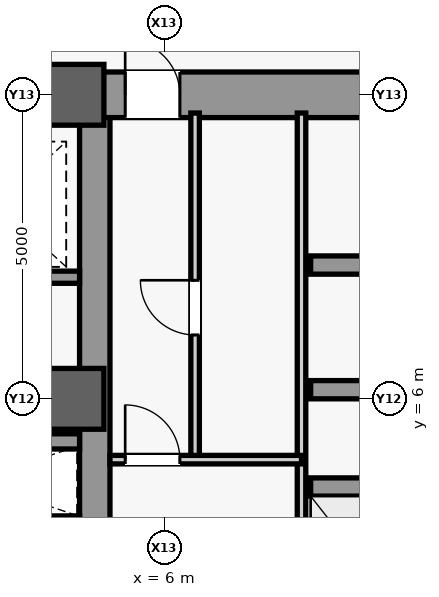
"""IFC4 building model, lengths in metres.
Left out: names, types, materials, properties, quantities, classifications, styles, units other than length and angle.
Written with IfcOpenShell. Run it as: python <this file> out.ifc"""

import sys

from ifc_helpers import new_model, si_unit, direction, frame, frame_2d, origin, origin_2d, place, context, subcontext, project, spatial, rectangle, extrude, source, transform, mapped, element, fill, save


model = new_model("IFC4")
c1 = context("Model", 3, precision=1e-05, world=origin(), true_north=direction((0.0, 1.0)))
c2 = subcontext(c1, "Body", "Model", "MODEL_VIEW")
j1 = project(units=[si_unit("LENGTHUNIT", "METRE"), si_unit("PLANEANGLEUNIT", "RADIAN")], contexts=[c1])
p1 = place(None, origin())
s1 = spatial("IfcSite", under=j1, at=p1, CompositionType="ELEMENT")
p2 = place(p1, origin())
s2 = spatial("IfcBuilding", under=s1, at=p2, CompositionType="ELEMENT")
p3 = place(p2, frame((0.0, 0.0, 116.0)))
s3 = spatial("IfcBuildingStorey", under=s2, at=p3, CompositionType="ELEMENT", Elevation=116.0)
m1 = source(origin(), c2, "Body", "SweptSolid", [
    extrude(rectangle(XDim=21.4, YDim=0.5, at=frame_2d((10.7, 0.0))), origin(), (0.0, 0.0, 1.0), 3.84),
])
p4 = place(p3, frame((4.85, -10.7, 0.0), z_axis=(0.0, 0.0, 1.0), x_axis=(0.0, 1.0, 0.0)))
e1 = element("IfcWall", 1, at=p4, inside=s3, PredefinedType="SHEAR", context=c2, shape_type="MappedRepresentation", body=[
    mapped(m1, transform((0.0, 0.0, 0.0), scale=1.0)),
])
m2 = source(origin(), c2, "Body", "SweptSolid", [
    extrude(rectangle(XDim=5.85, YDim=0.75, at=frame_2d((2.925, 0.0))), origin(), (0.0, 0.0, 1.0), 3.84),
])
p5 = place(p3, frame((4.85, 11.0, 0.0), z_axis=(0.0, 0.0, 1.0), x_axis=(1.0, 0.0, 0.0)))
e2 = element("IfcWall", 2, at=p5, inside=s3, PredefinedType="SHEAR", context=c2, shape_type="MappedRepresentation", body=[
    mapped(m2, transform((0.0, 0.0, 0.0), scale=1.0)),
])
m3 = source(origin(), c2, "Body", "SweptSolid", [
    extrude(rectangle(XDim=0.9, YDim=2.15, at=frame_2d((0.45, 1.075))), frame((0.0, 0.385, 0.0), z_axis=(0.0, -1.0, 0.0), x_axis=(1.0, 0.0, 0.0)), (0.0, 0.0, 1.0), 0.77),
])
p6 = place(p5, frame((0.5, 0.0, 0.0)))
e3 = element("IfcOpeningElement", 3, at=p6, cuts=e2, PredefinedType="OPENING", context=c2, shape_type="MappedRepresentation", body=[
    mapped(m3, transform((0.0, 0.0, 0.0), scale=1.0)),
])
m4 = source(origin(), c2, "Body", "SweptSolid", [
    extrude(rectangle(XDim=9.2, YDim=0.5, at=frame_2d((4.6, 0.0))), origin(), (0.0, 0.0, 1.0), 3.84),
])
p7 = place(p3, frame((-4.6, 11.0, 0.0), z_axis=(0.0, 0.0, 1.0), x_axis=(1.0, 0.0, 0.0)))
e4 = element("IfcWall", 4, at=p7, inside=s3, PredefinedType="SHEAR", context=c2, shape_type="MappedRepresentation", body=[
    mapped(m4, transform((0.0, 0.0, 0.0), scale=1.0)),
])
m5 = source(origin(), c2, "Body", "SweptSolid", [
    extrude(rectangle(XDim=1.8, YDim=2.25, at=frame_2d((0.9, 1.125))), frame((0.0, 0.26, 0.0), z_axis=(0.0, -1.0, 0.0), x_axis=(1.0, 0.0, 0.0)), (0.0, 0.0, 1.0), 0.52),
])
p8 = place(p7, frame((3.7, 0.0, 0.0)))
e5 = element("IfcOpeningElement", 5, at=p8, cuts=e4, PredefinedType="OPENING", context=c2, shape_type="MappedRepresentation", body=[
    mapped(m5, transform((0.0, 0.0, 0.0), scale=1.0)),
])
m6 = source(origin(), c2, "Body", "SweptSolid", [
    extrude(rectangle(XDim=1.0, YDim=1.0, at=origin_2d()), origin(), (0.0, 0.0, 1.0), 4.1),
])
for number, where, z_axis, x_axis in (
    (6, (4.5, 6.0, 0.0), (0.0, 0.0, 1.0), (1.0, 0.0, 0.0)),
    (7, (4.5, 11.0, 0.0), (0.0, 0.0, 1.0), (1.0, 0.0, 0.0)),
):
    element("IfcColumn", number, at=place(p3, frame(where, z_axis=z_axis, x_axis=x_axis)), inside=s3, PredefinedType="COLUMN", context=c2, shape_type="MappedRepresentation", body=[
        mapped(m6, transform((0.0, 0.0, 0.0), scale=1.0)),
    ])
m7 = source(origin(), c2, "Body", "SweptSolid", [
    extrude(rectangle(XDim=2.3, YDim=0.3, at=frame_2d((1.15, 0.0))), origin(), (0.0, 0.0, 1.0), 3.84),
])
for number, where, z_axis, x_axis in (
    (8, (8.4, 4.55, 0.0), (0.0, 0.0, 1.0), (1.0, 0.0, 0.0)),
    (9, (8.4, 6.15, 0.0), (0.0, 0.0, 1.0), (1.0, 0.0, 0.0)),
    (10, (8.4, 8.2, 0.0), (0.0, 0.0, 1.0), (1.0, 0.0, 0.0)),
):
    element("IfcWall", number, at=place(p3, frame(where, z_axis=z_axis, x_axis=x_axis)), inside=s3, PredefinedType="SHEAR", context=c2, shape_type="MappedRepresentation", body=[
        mapped(m7, transform((0.0, 0.0, 0.0), scale=1.0)),
    ])
m8 = source(origin(), c2, "Body", "SweptSolid", [
    extrude(rectangle(XDim=9.4, YDim=0.14, at=frame_2d((4.7, 0.0))), origin(), (0.0, 0.0, 1.0), 3.84),
])
p9 = place(p3, frame((8.25, 1.3, 0.0), z_axis=(0.0, 0.0, 1.0), x_axis=(0.0, 1.0, 0.0)))
e11 = element("IfcWall", 11, at=p9, inside=s3, PredefinedType="PARTITIONING", context=c2, shape_type="MappedRepresentation", body=[
    mapped(m8, transform((0.0, 0.0, 0.0), scale=1.0)),
])
m9 = source(origin(), c2, "Body", "SweptSolid", [
    extrude(rectangle(XDim=5.7, YDim=0.14, at=frame_2d((2.85, 0.0))), origin(), (0.0, 0.0, 1.0), 3.84),
])
p10 = place(p3, frame((6.5, 5.0, 0.0), z_axis=(0.0, 0.0, 1.0), x_axis=(0.0, 1.0, 0.0)))
e12 = element("IfcWall", 12, at=p10, inside=s3, PredefinedType="PARTITIONING", context=c2, shape_type="MappedRepresentation", body=[
    mapped(m9, transform((0.0, 0.0, 0.0), scale=1.0)),
])
m10 = source(origin(), c2, "Body", "SweptSolid", [
    extrude(rectangle(XDim=0.9, YDim=2.15, at=frame_2d((0.45, 1.075))), frame((0.0, 0.08, 0.0), z_axis=(0.0, -1.0, 0.0), x_axis=(1.0, 0.0, 0.0)), (0.0, 0.0, 1.0), 0.16),
])
p11 = place(p10, frame((2.05, 0.0, 0.0)))
e13 = element("IfcOpeningElement", 13, at=p11, cuts=e12, PredefinedType="OPENING", context=c2, shape_type="MappedRepresentation", body=[
    mapped(m10, transform((0.0, 0.0, 0.0), scale=1.0)),
])
m11 = source(origin(), c2, "Body", "SweptSolid", [
    extrude(rectangle(XDim=3.15, YDim=0.14, at=frame_2d((1.575, 0.0))), origin(), (0.0, 0.0, 1.0), 3.84),
])
p12 = place(p3, frame((5.1, 5.0, 0.0), z_axis=(0.0, 0.0, 1.0), x_axis=(1.0, 0.0, 0.0)))
e14 = element("IfcWall", 14, at=p12, inside=s3, PredefinedType="PARTITIONING", context=c2, shape_type="MappedRepresentation", body=[
    mapped(m11, transform((0.0, 0.0, 0.0), scale=1.0)),
])
p13 = place(p12, frame((0.25, 0.0, 0.0)))
e15 = element("IfcOpeningElement", 15, at=p13, cuts=e14, PredefinedType="OPENING", context=c2, shape_type="MappedRepresentation", body=[
    mapped(m10, transform((0.0, 0.0, 0.0), scale=1.0)),
])
m12 = source(origin(), c2, "Body", "SweptSolid", [
    extrude(rectangle(XDim=3.45, YDim=0.15, at=frame_2d((1.725, 0.0))), origin(), (0.0, 0.0, 1.0), 3.84),
])
p14 = place(p3, frame((1.15, 4.0, 0.0), z_axis=(0.0, 0.0, 1.0), x_axis=(1.0, 0.0, 0.0)))
e16 = element("IfcWall", 16, at=p14, inside=s3, PredefinedType="PARTITIONING", context=c2, shape_type="MappedRepresentation", body=[
    mapped(m12, transform((0.0, 0.0, 0.0), scale=1.0)),
])
m13 = source(origin(), c2, "Body", "SweptSolid", [
    extrude(rectangle(XDim=2.45, YDim=0.2, at=frame_2d((1.225, 0.0))), origin(), (0.0, 0.0, 1.0), 3.84),
])
p15 = place(p3, frame((2.15, 8.0, 0.0), z_axis=(0.0, 0.0, 1.0), x_axis=(1.0, 0.0, 0.0)))
e17 = element("IfcWall", 17, at=p15, inside=s3, PredefinedType="SHEAR", context=c2, shape_type="MappedRepresentation", body=[
    mapped(m13, transform((0.0, 0.0, 0.0), scale=1.0)),
])
m14 = source(origin(), c2, "Body", "SweptSolid", [
    extrude(rectangle(XDim=9.2, YDim=0.25, at=frame_2d((4.6, 0.0))), origin(), (0.0, 0.0, 1.0), 3.84),
])
p16 = place(p3, frame((-4.6, 5.3, 0.0), z_axis=(0.0, 0.0, 1.0), x_axis=(1.0, 0.0, 0.0)))
e18 = element("IfcWall", 18, at=p16, inside=s3, PredefinedType="SHEAR", context=c2, shape_type="MappedRepresentation", body=[
    mapped(m14, transform((0.0, 0.0, 0.0), scale=1.0)),
])
m15 = source(origin(), c2, "Body", "SweptSolid", [
    extrude(rectangle(XDim=1.05, YDim=2.2, at=frame_2d((0.525, 1.1))), frame((0.0, 0.135, 0.0), z_axis=(0.0, -1.0, 0.0), x_axis=(1.0, 0.0, 0.0)), (0.0, 0.0, 1.0), 0.27),
])
p17 = place(p16, frame((4.075, 0.0, 0.0)))
e19 = element("IfcOpeningElement", 19, at=p17, cuts=e18, PredefinedType="OPENING", context=c2, shape_type="MappedRepresentation", body=[
    mapped(m15, transform((0.0, 0.0, 0.0), scale=1.0)),
])
m16 = source(origin(), c2, "Body", "SweptSolid", [
    extrude(rectangle(XDim=0.9, YDim=2.15, at=frame_2d((0.45, 1.075))), frame((0.0, 0.025, 0.0), z_axis=(0.0, -1.0, 0.0), x_axis=(1.0, 0.0, 0.0)), (0.0, 0.0, 1.0), 0.05),
])
p18 = place(p6, origin())
e20 = element("IfcDoor", 20, at=p18, inside=s3, OperationType="SINGLE_SWING_LEFT", PredefinedType="DOOR", context=c2, shape_type="MappedRepresentation", body=[
    mapped(m16, transform((0.0, 0.0, 0.0), scale=1.0)),
])
fill(e3, e20)
p19 = place(p11, origin())
e21 = element("IfcDoor", 21, at=p19, inside=s3, OperationType="SINGLE_SWING_RIGHT", PredefinedType="DOOR", context=c2, shape_type="MappedRepresentation", body=[
    mapped(m16, transform((0.0, 0.0, 0.0), scale=1.0)),
])
fill(e13, e21)
p20 = place(p13, origin())
e22 = element("IfcDoor", 22, at=p20, inside=s3, OperationType="SINGLE_SWING_LEFT", PredefinedType="DOOR", context=c2, shape_type="MappedRepresentation", body=[
    mapped(m16, transform((0.0, 0.0, 0.0), scale=1.0)),
])
fill(e15, e22)
save(model, sys.argv[1])
